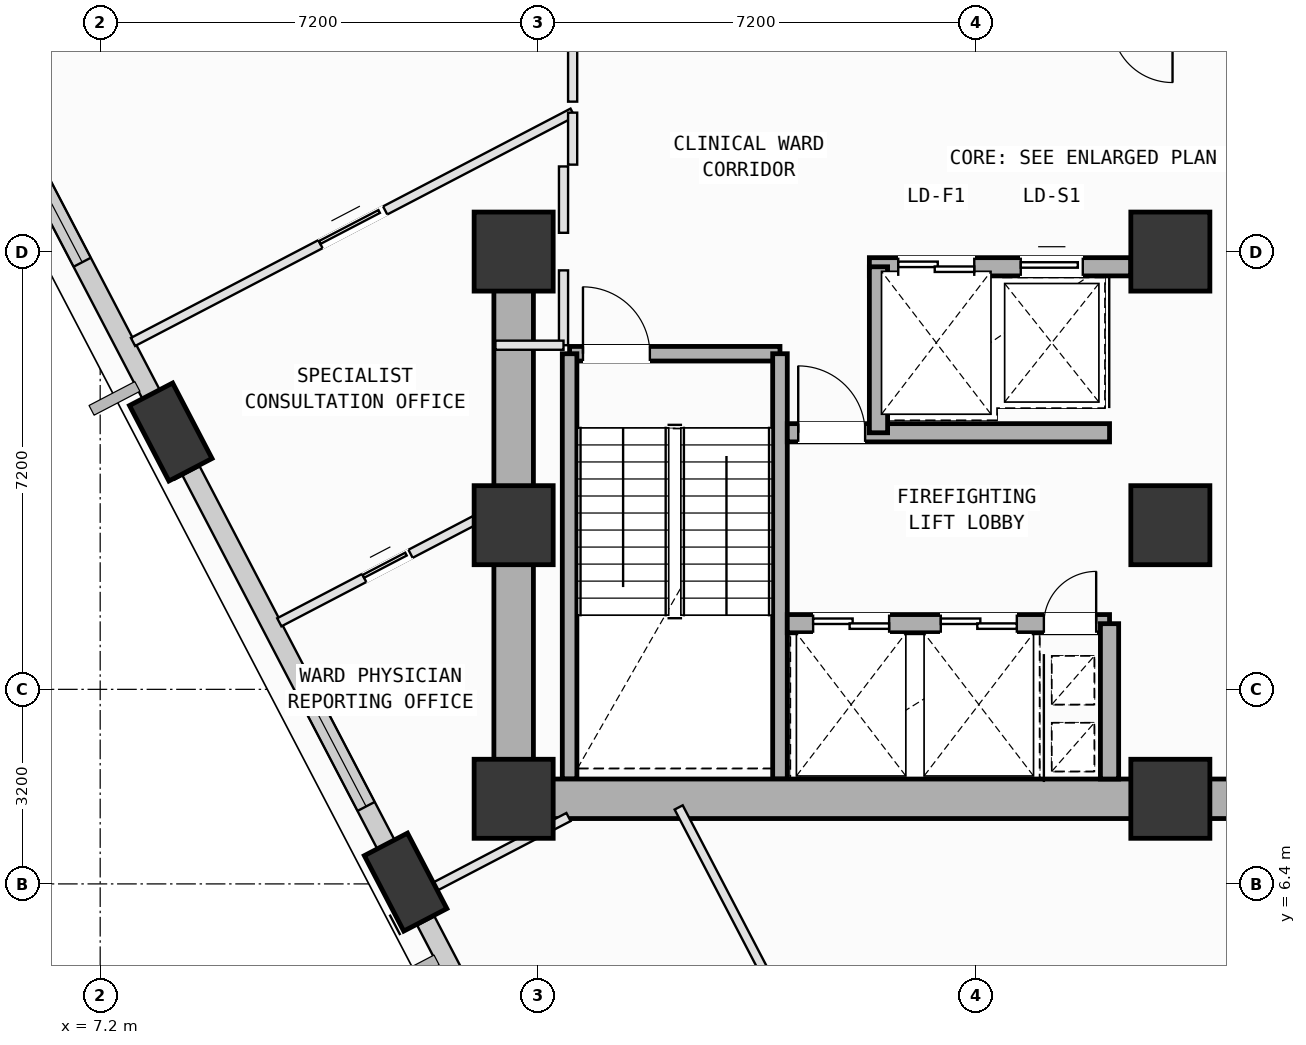
"""IFC4 building model, lengths in metres.
Left out: names, types, materials, properties, quantities, classifications, styles, units other than length and angle.
Written with IfcOpenShell. Run it as: python <this file> out.ifc"""

import sys

from ifc_helpers import new_model, si_unit, direction, frame, frame_2d, origin, origin_2d, place, context, subcontext, project, spatial, rectangle, extrude, element, fill, save


model = new_model("IFC4")
c1 = context("Model", 3, precision=1e-05, world=origin(), true_north=direction((0.0, 1.0)))
c2 = subcontext(c1, "Body", "Model", "MODEL_VIEW")
j1 = project(units=[si_unit("LENGTHUNIT", "METRE"), si_unit("PLANEANGLEUNIT", "RADIAN")], contexts=[c1])
p1 = place(None, origin())
s1 = spatial("IfcSite", under=j1, at=p1, CompositionType="ELEMENT")
p2 = place(p1, origin())
s2 = spatial("IfcBuilding", under=s1, at=p2, CompositionType="ELEMENT")
p3 = place(p2, frame((0.0, 0.0, 140.4)))
s3 = spatial("IfcBuildingStorey", under=s2, at=p3, CompositionType="ELEMENT", Elevation=140.4)
for number, where, z_axis, x_axis in (
    (1, (14.0, 7.8, 0.0), (0.0, 0.0, 1.0), (1.0, 0.0, 0.0)),
    (2, (14.0, 12.3, 0.0), (0.0, 0.0, 1.0), (1.0, 0.0, 0.0)),
    (3, (14.0, 16.8, 0.0), (0.0, 0.0, 1.0), (1.0, 0.0, 0.0)),
    (4, (24.8, 7.8, 0.0), (0.0, 0.0, 1.0), (1.0, 0.0, 0.0)),
    (5, (24.8, 12.3, 0.0), (0.0, 0.0, 1.0), (1.0, 0.0, 0.0)),
    (6, (24.8, 16.8, 0.0), (0.0, 0.0, 1.0), (1.0, 0.0, 0.0)),
):
    element("IfcColumn", number, at=place(p3, frame(where, z_axis=z_axis, x_axis=x_axis)), inside=s3, PredefinedType="COLUMN", context=c2, shape_type="SweptSolid", body=[
        extrude(rectangle(XDim=1.3, YDim=1.3, at=origin_2d()), origin(), (0.0, 0.0, 1.0), 4.0),
    ])
p4 = place(p3, frame((8.361, 13.833, 0.002), z_axis=(0.046037098105, -0.103567938652, 0.993556373681), x_axis=(-0.780457920553, 0.617080020514, 0.100487225696)))
e7 = element("IfcColumn", 7, at=p4, inside=s3, PredefinedType="COLUMN", context=c2, shape_type="SweptSolid", body=[
    extrude(rectangle(XDim=1.4, YDim=0.8, at=origin_2d()), origin(), (0.0, 0.0, 1.0), 3.93),
])
p5 = place(p3, frame((12.223, 6.429, 0.002), z_axis=(0.076374665405, -0.087374108673, 0.993243512749), x_axis=(-0.927793591428, 0.358626201607, 0.10288974306)))
e8 = element("IfcColumn", 8, at=p5, inside=s3, PredefinedType="COLUMN", context=c2, shape_type="SweptSolid", body=[
    extrude(rectangle(XDim=1.4, YDim=0.8, at=origin_2d()), origin(), (0.0, 0.0, 1.0), 3.929),
])
p6 = place(p3, frame((8.237, 14.071, 0.0), z_axis=(0.0, 0.0, 1.0), x_axis=(-0.462514432268, 0.886611752654, 0.0)))
e9 = element("IfcWall", 9, at=p6, inside=s3, PredefinedType="SOLIDWALL", context=c2, shape_type="SweptSolid", body=[
    extrude(rectangle(XDim=5.662, YDim=0.32, at=frame_2d((2.831, 0.0))), origin(), (0.0, 0.0, 1.0), 3.085),
])
p7 = place(p6, frame((2.881, 0.0, 0.75)))
e10 = element("IfcOpeningElement", 10, at=p7, cuts=e9, PredefinedType="OPENING", context=c2, shape_type="SweptSolid", body=[
    extrude(rectangle(XDim=1.6, YDim=1.95, at=frame_2d((0.8, 0.975))), frame((0.0, 0.17, 0.0), z_axis=(0.0, -1.0, 0.0), x_axis=(1.0, 0.0, 0.0)), (0.0, 0.0, 1.0), 0.34),
])
p8 = place(p3, frame((12.1, 6.665, 0.0), z_axis=(0.0, 0.0, 1.0), x_axis=(-0.462525196515, 0.886606137238, 0.0)))
e11 = element("IfcWall", 11, at=p8, inside=s3, PredefinedType="SOLIDWALL", context=c2, shape_type="SweptSolid", body=[
    extrude(rectangle(XDim=7.36, YDim=0.32, at=frame_2d((3.68, 0.0))), origin(), (0.0, 0.0, 1.0), 3.085),
])
p9 = place(p8, frame((1.138, 0.0, 0.75)))
e12 = element("IfcOpeningElement", 12, at=p9, cuts=e11, PredefinedType="OPENING", context=c2, shape_type="SweptSolid", body=[
    extrude(rectangle(XDim=2.0, YDim=1.95, at=frame_2d((1.0, 0.975))), frame((0.0, 0.17, 0.0), z_axis=(0.0, -1.0, 0.0), x_axis=(1.0, 0.0, 0.0)), (0.0, 0.0, 1.0), 0.34),
])
p10 = place(p3, frame((15.434, 0.273, 0.0), z_axis=(0.0, 0.0, 1.0), x_axis=(-0.462493611838, 0.886622613635, 0.0)))
e13 = element("IfcWall", 13, at=p10, inside=s3, PredefinedType="SOLIDWALL", context=c2, shape_type="SweptSolid", body=[
    extrude(rectangle(XDim=6.224, YDim=0.32, at=frame_2d((3.112, 0.0))), origin(), (0.0, 0.0, 1.0), 3.085),
])
p11 = place(p10, frame((2.414, 0.0, 0.75)))
e14 = element("IfcOpeningElement", 14, at=p11, cuts=e13, PredefinedType="OPENING", context=c2, shape_type="SweptSolid", body=[
    extrude(rectangle(XDim=1.4, YDim=1.85, at=frame_2d((0.7, 0.925))), frame((0.0, 0.17, 0.0), z_axis=(0.0, -1.0, 0.0), x_axis=(1.0, 0.0, 0.0)), (0.0, 0.0, 1.0), 0.34),
])
p12 = place(p3, frame((14.92, 15.12, 0.0), z_axis=(0.0, 0.0, 1.0), x_axis=(1.0, 0.0, 0.0)))
e15 = element("IfcWall", 15, at=p12, inside=s3, PredefinedType="SOLIDWALL", context=c2, shape_type="SweptSolid", body=[
    extrude(rectangle(XDim=3.46, YDim=0.24, at=frame_2d((1.73, 0.0))), origin(), (0.0, 0.0, 1.0), 3.7),
])
p13 = place(p12, frame((0.22, 0.0, 0.0)))
e16 = element("IfcOpeningElement", 16, at=p13, cuts=e15, PredefinedType="OPENING", context=c2, shape_type="SweptSolid", body=[
    extrude(rectangle(XDim=1.1, YDim=2.15, at=frame_2d((0.55, 1.075))), frame((0.0, 0.13, 0.0), z_axis=(0.0, -1.0, 0.0), x_axis=(1.0, 0.0, 0.0)), (0.0, 0.0, 1.0), 0.26),
])
for number, where, z_axis, x_axis in (
    (17, (18.38, 15.12, 0.0), (0.0, 0.0, 1.0), (0.0, -1.0, 0.0)),
    (18, (14.92, 8.125, 0.0), (0.0, 0.0, 1.0), (0.0, 1.0, 0.0)),
):
    element("IfcWall", number, at=place(p3, frame(where, z_axis=z_axis, x_axis=x_axis)), inside=s3, PredefinedType="SOLIDWALL", context=c2, shape_type="SweptSolid", body=[
        extrude(rectangle(XDim=6.995, YDim=0.24, at=frame_2d((3.498, 0.0))), origin(), (0.0, 0.0, 1.0), 3.7),
    ])
for number, where, z_axis, x_axis in (
    (19, (14.0, 7.8, 0.0), (0.0, 0.0, 1.0), (1.0, 0.0, 0.0)),
    (20, (24.8, 7.8, 0.0), (0.0, 0.0, 1.0), (1.0, 0.0, 0.0)),
):
    element("IfcWall", number, at=place(p3, frame(where, z_axis=z_axis, x_axis=x_axis)), inside=s3, PredefinedType="SHEAR", context=c2, shape_type="SweptSolid", body=[
        extrude(rectangle(XDim=10.8, YDim=0.65, at=frame_2d((5.4, 0.0))), origin(), (0.0, 0.0, 1.0), 3.7),
    ])
p14 = place(p3, frame((14.0, 16.8, 0.0), z_axis=(0.0, 0.0, 1.0), x_axis=(0.0, -1.0, 0.0)))
e21 = element("IfcWall", 21, at=p14, inside=s3, PredefinedType="SHEAR", context=c2, shape_type="SweptSolid", body=[
    extrude(rectangle(XDim=9.0, YDim=0.65, at=frame_2d((4.5, 0.0))), origin(), (0.0, 0.0, 1.0), 3.7),
])
p15 = place(p3, frame((19.85, 16.55, 0.0), z_axis=(0.0, 0.0, 1.0), x_axis=(1.0, 0.0, 0.0)))
e22 = element("IfcWall", 22, at=p15, inside=s3, PredefinedType="SOLIDWALL", context=c2, shape_type="SweptSolid", body=[
    extrude(rectangle(XDim=4.3, YDim=0.3, at=frame_2d((2.15, 0.0))), origin(), (0.0, 0.0, 1.0), 3.7),
])
p16 = place(p15, frame((0.475, 0.0, 0.0)))
e23 = element("IfcOpeningElement", 23, at=p16, cuts=e22, PredefinedType="OPENING", context=c2, shape_type="SweptSolid", body=[
    extrude(rectangle(XDim=1.25, YDim=2.18, at=frame_2d((0.625, 1.09))), frame((0.0, 0.16, 0.0), z_axis=(0.0, -1.0, 0.0), x_axis=(1.0, 0.0, 0.0)), (0.0, 0.0, 1.0), 0.32),
])
p17 = place(p15, frame((2.49, 0.0, 0.0)))
e24 = element("IfcOpeningElement", 24, at=p17, cuts=e22, PredefinedType="OPENING", context=c2, shape_type="SweptSolid", body=[
    extrude(rectangle(XDim=1.02, YDim=2.12, at=frame_2d((0.51, 1.06))), frame((0.0, 0.16, 0.0), z_axis=(0.0, -1.0, 0.0), x_axis=(1.0, 0.0, 0.0)), (0.0, 0.0, 1.0), 0.32),
])
p18 = place(p3, frame((18.5, 10.68, 0.0), z_axis=(0.0, 0.0, 1.0), x_axis=(1.0, 0.0, 0.0)))
e25 = element("IfcWall", 25, at=p18, inside=s3, PredefinedType="SOLIDWALL", context=c2, shape_type="SweptSolid", body=[
    extrude(rectangle(XDim=5.3, YDim=0.3, at=frame_2d((2.65, 0.0))), origin(), (0.0, 0.0, 1.0), 3.7),
])
p19 = place(p18, frame((4.22, 0.0, 0.0)))
e26 = element("IfcOpeningElement", 26, at=p19, cuts=e25, PredefinedType="OPENING", context=c2, shape_type="SweptSolid", body=[
    extrude(rectangle(XDim=0.86, YDim=2.06, at=frame_2d((0.43, 1.03))), frame((0.0, 0.16, 0.0), z_axis=(0.0, -1.0, 0.0), x_axis=(1.0, 0.0, 0.0)), (0.0, 0.0, 1.0), 0.32),
])
p20 = place(p18, frame((0.425, 0.0, 0.0)))
e27 = element("IfcOpeningElement", 27, at=p20, cuts=e25, PredefinedType="OPENING", context=c2, shape_type="SweptSolid", body=[
    extrude(rectangle(XDim=1.25, YDim=2.18, at=frame_2d((0.625, 1.09))), frame((0.0, 0.16, 0.0), z_axis=(0.0, -1.0, 0.0), x_axis=(1.0, 0.0, 0.0)), (0.0, 0.0, 1.0), 0.32),
])
p21 = place(p18, frame((2.525, 0.0, 0.0)))
e28 = element("IfcOpeningElement", 28, at=p21, cuts=e25, PredefinedType="OPENING", context=c2, shape_type="SweptSolid", body=[
    extrude(rectangle(XDim=1.25, YDim=2.18, at=frame_2d((0.625, 1.09))), frame((0.0, 0.16, 0.0), z_axis=(0.0, -1.0, 0.0), x_axis=(1.0, 0.0, 0.0)), (0.0, 0.0, 1.0), 0.32),
])
p22 = place(p3, frame((18.5, 13.82, 0.0), z_axis=(0.0, 0.0, 1.0), x_axis=(1.0, 0.0, 0.0)))
e29 = element("IfcWall", 29, at=p22, inside=s3, PredefinedType="SOLIDWALL", context=c2, shape_type="SweptSolid", body=[
    extrude(rectangle(XDim=5.3, YDim=0.3, at=frame_2d((2.65, 0.0))), origin(), (0.0, 0.0, 1.0), 3.7),
])
p23 = place(p22, frame((0.18, 0.0, 0.0)))
e30 = element("IfcOpeningElement", 30, at=p23, cuts=e29, PredefinedType="OPENING", context=c2, shape_type="SweptSolid", body=[
    extrude(rectangle(XDim=1.1, YDim=2.15, at=frame_2d((0.55, 1.075))), frame((0.0, 0.16, 0.0), z_axis=(0.0, -1.0, 0.0), x_axis=(1.0, 0.0, 0.0)), (0.0, 0.0, 1.0), 0.32),
])
p24 = place(p3, frame((23.8, 8.125, 0.0), z_axis=(0.0, 0.0, 1.0), x_axis=(0.0, 1.0, 0.0)))
e31 = element("IfcWall", 31, at=p24, inside=s3, PredefinedType="SOLIDWALL", context=c2, shape_type="SweptSolid", body=[
    extrude(rectangle(XDim=2.555, YDim=0.3, at=frame_2d((1.277, 0.0))), origin(), (0.0, 0.0, 1.0), 3.7),
])
p25 = place(p3, frame((20.0, 13.82, 0.0), z_axis=(0.0, 0.0, 1.0), x_axis=(0.0, 1.0, 0.0)))
e32 = element("IfcWall", 32, at=p25, inside=s3, PredefinedType="SOLIDWALL", context=c2, shape_type="SweptSolid", body=[
    extrude(rectangle(XDim=2.73, YDim=0.3, at=frame_2d((1.365, 0.0))), origin(), (0.0, 0.0, 1.0), 3.7),
])
p26 = place(p3, frame((23.525, -5.399, 0.0), z_axis=(0.0, 0.0, 1.0), x_axis=(-0.462486118374, 0.88662652245, 0.0)))
e33 = element("IfcWall", 33, at=p26, inside=s3, PredefinedType="PARTITIONING", context=c2, shape_type="SweptSolid", body=[
    extrude(rectangle(XDim=14.727, YDim=0.15, at=frame_2d((7.363, 0.0))), origin(), (0.0, 0.0, 1.0), 3.7),
])
p27 = place(p3, frame((14.902, 7.5, 0.0), z_axis=(0.0, 0.0, 1.0), x_axis=(-0.886610116456, -0.462517568745, 0.0)))
e34 = element("IfcWall", 34, at=p27, inside=s3, PredefinedType="PARTITIONING", context=c2, shape_type="SweptSolid", body=[
    extrude(rectangle(XDim=3.101, YDim=0.15, at=frame_2d((1.55, 0.0))), origin(), (0.0, 0.0, 1.0), 2.885),
])
p28 = place(p3, frame((12.153, 6.066, 0.0), z_axis=(0.0, 0.0, 1.0), x_axis=(-0.462250926038, 0.886749164859, 0.0)))
e35 = element("IfcWall", 35, at=p28, inside=s3, PredefinedType="PARTITIONING", context=c2, shape_type="SweptSolid", body=[
    extrude(rectangle(XDim=0.556, YDim=0.15, at=frame_2d((0.278, 0.0))), origin(), (0.0, 0.0, 1.0), 3.085),
])
p29 = place(p3, frame((10.146, 10.703, 0.0), z_axis=(0.0, 0.0, 1.0), x_axis=(0.886483842084, 0.462759546335, 0.0)))
e36 = element("IfcWall", 36, at=p29, inside=s3, PredefinedType="PARTITIONING", context=c2, shape_type="SweptSolid", body=[
    extrude(rectangle(XDim=4.009, YDim=0.15, at=frame_2d((2.004, 0.0))), origin(), (0.0, 0.0, 1.0), 3.7),
])
p30 = place(p29, frame((1.574, 0.0, 0.0)))
e37 = element("IfcOpeningElement", 37, at=p30, cuts=e36, PredefinedType="OPENING", context=c2, shape_type="SweptSolid", body=[
    extrude(rectangle(XDim=0.86, YDim=2.06, at=frame_2d((0.43, 1.03))), frame((0.0, 0.085, 0.0), z_axis=(0.0, -1.0, 0.0), x_axis=(1.0, 0.0, 0.0)), (0.0, 0.0, 1.0), 0.17),
])
p31 = place(p3, frame((14.82, 18.2, 0.0), z_axis=(0.0, 0.0, 1.0), x_axis=(0.0, -1.0, 0.0)))
e38 = element("IfcWall", 38, at=p31, inside=s3, PredefinedType="PARTITIONING", context=c2, shape_type="SweptSolid", body=[
    extrude(rectangle(XDim=1.091, YDim=0.15, at=frame_2d((0.545, 0.0))), origin(), (0.0, 0.0, 1.0), 3.7),
])
p32 = place(p3, frame((14.82, 16.491, 0.0), z_axis=(0.0, 0.0, 1.0), x_axis=(0.0, -1.0, 0.0)))
e39 = element("IfcWall", 39, at=p32, inside=s3, PredefinedType="PARTITIONING", context=c2, shape_type="SweptSolid", body=[
    extrude(rectangle(XDim=1.231, YDim=0.15, at=frame_2d((0.615, 0.0))), origin(), (0.0, 0.0, 1.0), 3.7),
])
p33 = place(p3, frame((14.82, 15.26, 0.0), z_axis=(0.0, 0.0, 1.0), x_axis=(-1.0, 0.0, 0.0)))
e40 = element("IfcWall", 40, at=p33, inside=s3, PredefinedType="PARTITIONING", context=c2, shape_type="SweptSolid", body=[
    extrude(rectangle(XDim=1.12, YDim=0.15, at=frame_2d((0.56, 0.0))), origin(), (0.0, 0.0, 1.0), 3.7),
])
p34 = place(p3, frame((8.492, 13.085, 0.0), z_axis=(0.0, 0.0, 1.0), x_axis=(-0.462801553739, 0.886461912242, 0.0)))
e41 = element("IfcWall", 41, at=p34, inside=s3, PredefinedType="PARTITIONING", context=c2, shape_type="SweptSolid", body=[
    extrude(rectangle(XDim=0.992, YDim=0.15, at=frame_2d((0.496, 0.0))), origin(), (0.0, 0.0, 1.0), 3.085),
])
p35 = place(p3, frame((7.74, 15.314, 0.0), z_axis=(0.0, 0.0, 1.0), x_axis=(0.886643562376, 0.46245344987, 0.0)))
e42 = element("IfcWall", 42, at=p35, inside=s3, PredefinedType="PARTITIONING", context=c2, shape_type="SweptSolid", body=[
    extrude(rectangle(XDim=8.154, YDim=0.15, at=frame_2d((4.077, 0.0))), origin(), (0.0, 0.0, 1.0), 3.7),
])
p36 = place(p35, frame((3.477, 0.0, 0.0)))
e43 = element("IfcOpeningElement", 43, at=p36, cuts=e42, PredefinedType="OPENING", context=c2, shape_type="SweptSolid", body=[
    extrude(rectangle(XDim=1.2, YDim=2.15, at=frame_2d((0.6, 1.075))), frame((0.0, 0.085, 0.0), z_axis=(0.0, -1.0, 0.0), x_axis=(1.0, 0.0, 0.0)), (0.0, 0.0, 1.0), 0.17),
])
p37 = place(p3, frame((14.97, 19.085, 0.0), z_axis=(0.0, 0.0, 1.0), x_axis=(0.0, -1.0, 0.0)))
e44 = element("IfcWall", 44, at=p37, inside=s3, PredefinedType="PARTITIONING", context=c2, shape_type="SweptSolid", body=[
    extrude(rectangle(XDim=0.855, YDim=0.15, at=frame_2d((0.427, 0.0))), origin(), (0.0, 0.0, 1.0), 3.7),
])
p38 = place(p3, frame((14.97, 20.55, 0.0), z_axis=(0.0, 0.0, 1.0), x_axis=(0.0, -1.0, 0.0)))
e45 = element("IfcWall", 45, at=p38, inside=s3, PredefinedType="PARTITIONING", context=c2, shape_type="SweptSolid", body=[
    extrude(rectangle(XDim=1.284, YDim=0.15, at=frame_2d((0.642, 0.0))), origin(), (0.0, 0.0, 1.0), 2.885),
])
p39 = place(p3, frame((5.28, 19.895, 0.0), z_axis=(0.0, 0.0, 1.0), x_axis=(0.886580898603, 0.462573572777, 0.0)))
e46 = element("IfcWall", 46, at=p39, inside=s3, PredefinedType="PARTITIONING", context=c2, shape_type="SweptSolid", body=[
    extrude(rectangle(XDim=11.028, YDim=0.15, at=frame_2d((5.514, 0.0))), origin(), (0.0, 0.0, 1.0), 3.7),
])
p40 = place(p7, origin())
e47 = element("IfcWindow", 47, at=p40, inside=s3, PartitioningType="SINGLE_PANEL", PredefinedType="WINDOW", context=c2, shape_type="SweptSolid", body=[
    extrude(rectangle(XDim=1.6, YDim=1.95, at=frame_2d((0.8, 0.975))), frame((0.0, 0.03, 0.0), z_axis=(0.0, -1.0, 0.0), x_axis=(1.0, 0.0, 0.0)), (0.0, 0.0, 1.0), 0.06),
])
fill(e10, e47)
p41 = place(p9, origin())
e48 = element("IfcWindow", 48, at=p41, inside=s3, PartitioningType="SINGLE_PANEL", PredefinedType="WINDOW", context=c2, shape_type="SweptSolid", body=[
    extrude(rectangle(XDim=2.0, YDim=1.95, at=frame_2d((1.0, 0.975))), frame((0.0, 0.03, 0.0), z_axis=(0.0, -1.0, 0.0), x_axis=(1.0, 0.0, 0.0)), (0.0, 0.0, 1.0), 0.06),
])
fill(e12, e48)
p42 = place(p13, origin())
e49 = element("IfcDoor", 49, at=p42, inside=s3, OperationType="SINGLE_SWING_LEFT", PredefinedType="DOOR", context=c2, shape_type="SweptSolid", body=[
    extrude(rectangle(XDim=1.1, YDim=2.15, at=frame_2d((0.55, 1.075))), frame((0.0, 0.025, 0.0), z_axis=(0.0, -1.0, 0.0), x_axis=(1.0, 0.0, 0.0)), (0.0, 0.0, 1.0), 0.05),
])
fill(e16, e49)
p43 = place(p19, origin())
e50 = element("IfcDoor", 50, at=p43, inside=s3, OperationType="SINGLE_SWING_RIGHT", PredefinedType="DOOR", context=c2, shape_type="SweptSolid", body=[
    extrude(rectangle(XDim=0.86, YDim=2.06, at=frame_2d((0.43, 1.03))), frame((0.0, 0.025, 0.0), z_axis=(0.0, -1.0, 0.0), x_axis=(1.0, 0.0, 0.0)), (0.0, 0.0, 1.0), 0.05),
])
fill(e26, e50)
p44 = place(p23, origin())
e51 = element("IfcDoor", 51, at=p44, inside=s3, OperationType="SINGLE_SWING_LEFT", PredefinedType="DOOR", context=c2, shape_type="SweptSolid", body=[
    extrude(rectangle(XDim=1.1, YDim=2.15, at=frame_2d((0.55, 1.075))), frame((0.0, 0.025, 0.0), z_axis=(0.0, -1.0, 0.0), x_axis=(1.0, 0.0, 0.0)), (0.0, 0.0, 1.0), 0.05),
])
fill(e30, e51)
p45 = place(p20, origin())
e52 = element("IfcDoor", 52, at=p45, inside=s3, OperationType="DOUBLE_DOOR_SLIDING", PredefinedType="DOOR", context=c2, shape_type="SweptSolid", body=[
    extrude(rectangle(XDim=1.25, YDim=2.18, at=frame_2d((0.625, 1.09))), frame((0.0, 0.025, 0.0), z_axis=(0.0, -1.0, 0.0), x_axis=(1.0, 0.0, 0.0)), (0.0, 0.0, 1.0), 0.05),
])
fill(e27, e52)
p46 = place(p21, origin())
e53 = element("IfcDoor", 53, at=p46, inside=s3, OperationType="DOUBLE_DOOR_SLIDING", PredefinedType="DOOR", context=c2, shape_type="SweptSolid", body=[
    extrude(rectangle(XDim=1.25, YDim=2.18, at=frame_2d((0.625, 1.09))), frame((0.0, 0.025, 0.0), z_axis=(0.0, -1.0, 0.0), x_axis=(1.0, 0.0, 0.0)), (0.0, 0.0, 1.0), 0.05),
])
fill(e28, e53)
p47 = place(p16, origin())
e54 = element("IfcDoor", 54, at=p47, inside=s3, OperationType="DOUBLE_DOOR_SLIDING", PredefinedType="DOOR", context=c2, shape_type="SweptSolid", body=[
    extrude(rectangle(XDim=1.25, YDim=2.18, at=frame_2d((0.625, 1.09))), frame((0.0, 0.025, 0.0), z_axis=(0.0, -1.0, 0.0), x_axis=(1.0, 0.0, 0.0)), (0.0, 0.0, 1.0), 0.05),
])
fill(e23, e54)
p48 = place(p17, origin())
e55 = element("IfcDoor", 55, at=p48, inside=s3, OperationType="SLIDING_TO_LEFT", PredefinedType="DOOR", context=c2, shape_type="SweptSolid", body=[
    extrude(rectangle(XDim=1.02, YDim=2.12, at=frame_2d((0.51, 1.06))), frame((0.0, 0.025, 0.0), z_axis=(0.0, -1.0, 0.0), x_axis=(1.0, 0.0, 0.0)), (0.0, 0.0, 1.0), 0.05),
])
fill(e24, e55)
p49 = place(p36, origin())
e56 = element("IfcDoor", 56, at=p49, inside=s3, OperationType="SLIDING_TO_LEFT", PredefinedType="DOOR", context=c2, shape_type="SweptSolid", body=[
    extrude(rectangle(XDim=1.2, YDim=2.15, at=frame_2d((0.6, 1.075))), frame((0.0, 0.025, 0.0), z_axis=(0.0, -1.0, 0.0), x_axis=(1.0, 0.0, 0.0)), (0.0, 0.0, 1.0), 0.05),
])
fill(e43, e56)
p50 = place(p30, origin())
e57 = element("IfcDoor", 57, at=p50, inside=s3, OperationType="SLIDING_TO_LEFT", PredefinedType="DOOR", context=c2, shape_type="SweptSolid", body=[
    extrude(rectangle(XDim=0.86, YDim=2.06, at=frame_2d((0.43, 1.03))), frame((0.0, 0.025, 0.0), z_axis=(0.0, -1.0, 0.0), x_axis=(1.0, 0.0, 0.0)), (0.0, 0.0, 1.0), 0.05),
])
fill(e37, e57)
save(model, sys.argv[1])
